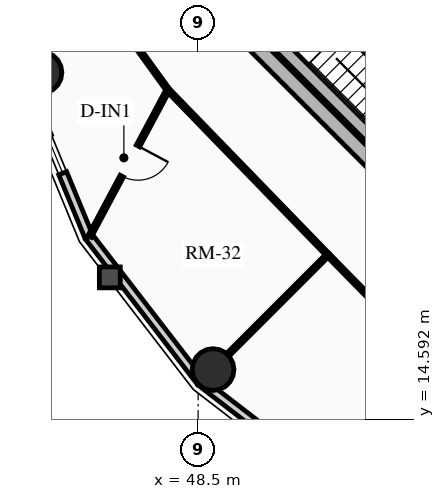
"""IFC4 building model, lengths in metres.
Left out: names, types, materials, properties, quantities, classifications, styles, units other than length and angle.
Written with IfcOpenShell. Run it as: python <this file> out.ifc"""

import sys

from ifc_helpers import new_model, si_unit, direction, frame, frame_2d, origin, origin_2d, place, context, subcontext, project, spatial, rectangle, circle, extrude, source, transform, mapped, element, fill, save


model = new_model("IFC4")
c1 = context("Model", 3, precision=1e-05, world=origin(), true_north=direction((0.0, 1.0)))
c2 = subcontext(c1, "Body", "Model", "MODEL_VIEW")
j1 = project(units=[si_unit("LENGTHUNIT", "METRE"), si_unit("PLANEANGLEUNIT", "RADIAN")], contexts=[c1])
p1 = place(None, origin())
s1 = spatial("IfcSite", under=j1, at=p1, CompositionType="ELEMENT")
p2 = place(p1, origin())
s2 = spatial("IfcBuilding", under=s1, at=p2, CompositionType="ELEMENT")
p3 = place(p2, frame((0.0, 0.0, 229.25)))
s3 = spatial("IfcBuildingStorey", under=s2, at=p3, CompositionType="ELEMENT", Elevation=229.25)
p4 = place(p3, frame((58.702, 15.732, 0.0), z_axis=(0.0, 0.0, 1.0), x_axis=(-0.707106781187, 0.707106781187, 0.0)))
e1 = element("IfcWall", 1, at=p4, inside=s3, PredefinedType="SHEAR", context=c2, shape_type="SweptSolid", body=[
    extrude(rectangle(XDim=14.1, YDim=0.4, at=frame_2d((7.05, 0.0))), origin(), (0.0, 0.0, 1.0), 3.2),
])
p5 = place(p3, frame((61.06, 18.373, 0.0), z_axis=(0.0, 0.0, 1.0), x_axis=(-0.707106781187, 0.707106781187, 0.0)))
e2 = element("IfcWall", 2, at=p5, inside=s3, PredefinedType="SHEAR", context=c2, shape_type="SweptSolid", body=[
    extrude(rectangle(XDim=13.7, YDim=0.35, at=frame_2d((6.85, 0.0))), origin(), (0.0, 0.0, 1.0), 3.2),
])
m1 = source(origin(), c2, "Body", "SweptSolid", [
    extrude(rectangle(XDim=1.1, YDim=2.015, at=frame_2d((0.55, 1.007))), frame((0.0, 0.185, 0.0), z_axis=(0.0, -1.0, 0.0), x_axis=(1.0, 0.0, 0.0)), (0.0, 0.0, 1.0), 0.37),
])
p6 = place(p5, frame((4.85, 0.0, 0.0)))
e3 = element("IfcOpeningElement", 3, at=p6, cuts=e2, PredefinedType="OPENING", context=c2, shape_type="MappedRepresentation", body=[
    mapped(m1, transform((0.0, 0.0, 0.0), x_axis=(1.0, 0.0, 0.0), y_axis=(0.0, 1.0, 0.0), z_axis=(0.0, 0.0, 1.0), scale=1.0)),
])
p7 = place(p5, frame((0.625, 0.0, 0.0)))
e4 = element("IfcOpeningElement", 4, at=p7, cuts=e2, PredefinedType="OPENING", context=c2, shape_type="MappedRepresentation", body=[
    mapped(m1, transform((0.0, 0.0, 0.0), x_axis=(1.0, 0.0, 0.0), y_axis=(0.0, 1.0, 0.0), z_axis=(0.0, 0.0, 1.0), scale=1.0)),
])
p8 = place(p5, frame((2.625, 0.0, 0.0)))
e5 = element("IfcOpeningElement", 5, at=p8, cuts=e2, PredefinedType="OPENING", context=c2, shape_type="MappedRepresentation", body=[
    mapped(m1, transform((0.0, 0.0, 0.0), x_axis=(1.0, 0.0, 0.0), y_axis=(0.0, 1.0, 0.0), z_axis=(0.0, 0.0, 1.0), scale=1.0)),
])
m2 = source(origin(), c2, "Body", "SweptSolid", [
    extrude(rectangle(XDim=1.15, YDim=2.02, at=frame_2d((0.575, 1.01))), frame((0.0, 0.185, 0.0), z_axis=(0.0, -1.0, 0.0), x_axis=(1.0, 0.0, 0.0)), (0.0, 0.0, 1.0), 0.37),
])
p9 = place(p5, frame((7.27, 0.0, 0.0)))
e6 = element("IfcOpeningElement", 6, at=p9, cuts=e2, PredefinedType="OPENING", context=c2, shape_type="MappedRepresentation", body=[
    mapped(m2, transform((0.0, 0.0, 0.0), x_axis=(1.0, 0.0, 0.0), y_axis=(0.0, 1.0, 0.0), z_axis=(0.0, 0.0, 1.0), scale=1.0)),
])
p10 = place(p3, frame((53.922, 21.141, 0.0), z_axis=(0.0, 0.0, 1.0), x_axis=(-0.707106781187, 0.707106781187, 0.0)))
e7 = element("IfcWall", 7, at=p10, inside=s3, PredefinedType="SHEAR", context=c2, shape_type="SweptSolid", body=[
    extrude(rectangle(XDim=6.695, YDim=0.35, at=frame_2d((3.348, 0.0))), origin(), (0.0, 0.0, 1.0), 3.2),
])
for number, where, z_axis, x_axis in (
    (8, (44.365, 23.709, 0.0), (0.0, 0.0, 1.0), (1.0, 0.0, 0.0)),
    (9, (48.893, 15.893, 0.0), (0.0, 0.0, 1.0), (1.0, 0.0, 0.0)),
):
    element("IfcColumn", number, at=place(p3, frame(where, z_axis=z_axis, x_axis=x_axis)), inside=s3, PredefinedType="USERDEFINED", context=c2, shape_type="SweptSolid", body=[
        extrude(circle(Radius=0.55, at=origin_2d()), origin(), (0.0, 0.0, 1.0), 3.2),
    ])
p11 = place(p3, frame((45.626, 19.387, 0.0), z_axis=(0.0, 0.0, 1.0), x_axis=(-0.381309704956, 0.924447353237, 0.0)))
e10 = element("IfcWall", 10, at=p11, inside=s3, PredefinedType="SOLIDWALL", context=c2, shape_type="SweptSolid", body=[
    extrude(rectangle(XDim=4.671, YDim=0.22, at=frame_2d((2.335, 0.0))), origin(), (0.0, 0.0, 1.0), 2.612),
])
m3 = source(origin(), c2, "Body", "SweptSolid", [
    extrude(rectangle(XDim=1.05, YDim=1.3, at=frame_2d((0.525, 0.65))), frame((0.0, 0.12, 0.0), z_axis=(0.0, -1.0, 0.0), x_axis=(1.0, 0.0, 0.0)), (0.0, 0.0, 1.0), 0.24),
])
p12 = place(p11, frame((1.81, 0.0, 0.65)))
e11 = element("IfcOpeningElement", 11, at=p12, cuts=e10, PredefinedType="OPENING", context=c2, shape_type="MappedRepresentation", body=[
    mapped(m3, transform((0.0, 0.0, 0.0), x_axis=(1.0, 0.0, 0.0), y_axis=(0.0, 1.0, 0.0), z_axis=(0.0, 0.0, 1.0), scale=1.0)),
])
p13 = place(p3, frame((48.569, 15.569, 0.0), z_axis=(0.0, 0.0, 1.0), x_axis=(-0.610523083886, 0.791998462147, 0.0)))
e12 = element("IfcWall", 12, at=p13, inside=s3, PredefinedType="SOLIDWALL", context=c2, shape_type="SweptSolid", body=[
    extrude(rectangle(XDim=4.82, YDim=0.22, at=frame_2d((2.41, 0.0))), origin(), (0.0, 0.0, 1.0), 2.612),
])
p14 = place(p3, frame((52.387, 12.626, 0.0), z_axis=(0.0, 0.0, 1.0), x_axis=(-0.791998462147, 0.610523083886, 0.0)))
e13 = element("IfcWall", 13, at=p14, inside=s3, PredefinedType="SOLIDWALL", context=c2, shape_type="SweptSolid", body=[
    extrude(rectangle(XDim=4.82, YDim=0.22, at=frame_2d((2.41, 0.0))), origin(), (0.0, 0.0, 1.0), 2.612),
])
p15 = place(p14, frame((1.885, 0.0, 0.65)))
e14 = element("IfcOpeningElement", 14, at=p15, cuts=e13, PredefinedType="OPENING", context=c2, shape_type="MappedRepresentation", body=[
    mapped(m3, transform((0.0, 0.0, 0.0), x_axis=(1.0, 0.0, 0.0), y_axis=(0.0, 1.0, 0.0), z_axis=(0.0, 0.0, 1.0), scale=1.0)),
])
p16 = place(p3, frame((46.795, 24.513, 0.0), z_axis=(0.0, 0.0, 1.0), x_axis=(0.585628197524, -0.810579801294, 0.0)))
e15 = element("IfcWall", 15, at=p16, inside=s3, PredefinedType="MOVABLE", context=c2, shape_type="SweptSolid", body=[
    extrude(rectangle(XDim=1.554, YDim=0.1, at=frame_2d((0.777, 0.0))), origin(), (0.0, 0.0, 1.0), 2.545),
])
p17 = place(p3, frame((47.706, 23.253, 0.0), z_axis=(0.0, 0.0, 1.0), x_axis=(0.696179266346, -0.717867974707, 0.0)))
e16 = element("IfcWall", 16, at=p17, inside=s3, PredefinedType="MOVABLE", context=c2, shape_type="SweptSolid", body=[
    extrude(rectangle(XDim=6.045, YDim=0.1, at=frame_2d((3.022, 0.0))), origin(), (0.0, 0.0, 1.0), 2.545),
])
p18 = place(p3, frame((51.914, 18.914, 0.0), z_axis=(0.0, 0.0, 1.0), x_axis=(0.699999313799, -0.714143515465, 0.0)))
e17 = element("IfcWall", 17, at=p18, inside=s3, PredefinedType="MOVABLE", context=c2, shape_type="SweptSolid", body=[
    extrude(rectangle(XDim=6.162, YDim=0.1, at=frame_2d((3.081, 0.0))), origin(), (0.0, 0.0, 1.0), 2.545),
])
m4 = source(origin(), c2, "Body", "SweptSolid", [
    extrude(rectangle(XDim=1.05, YDim=2.015, at=frame_2d((0.525, 1.007))), frame((0.0, 0.06, 0.0), z_axis=(0.0, -1.0, 0.0), x_axis=(1.0, 0.0, 0.0)), (0.0, 0.0, 1.0), 0.12),
])
p19 = place(p18, frame((2.556, 0.0, 0.0)))
e18 = element("IfcOpeningElement", 18, at=p19, cuts=e17, PredefinedType="OPENING", context=c2, shape_type="MappedRepresentation", body=[
    mapped(m4, transform((0.0, 0.0, 0.0), x_axis=(1.0, 0.0, 0.0), y_axis=(0.0, 1.0, 0.0), z_axis=(0.0, 0.0, 1.0), scale=1.0)),
])
p20 = place(p3, frame((51.914, 18.914, 0.0), z_axis=(0.0, 0.0, 1.0), x_axis=(-0.707106781187, -0.707106781187, 0.0)))
e19 = element("IfcWall", 19, at=p20, inside=s3, PredefinedType="MOVABLE", context=c2, shape_type="SweptSolid", body=[
    extrude(rectangle(XDim=4.71, YDim=0.1, at=frame_2d((2.355, 0.0))), origin(), (0.0, 0.0, 1.0), 2.612),
])
p21 = place(p3, frame((47.706, 23.253, 0.0), z_axis=(0.0, 0.0, 1.0), x_axis=(-0.471384756618, -0.881927667799, 0.0)))
e20 = element("IfcWall", 20, at=p21, inside=s3, PredefinedType="MOVABLE", context=c2, shape_type="SweptSolid", body=[
    extrude(rectangle(XDim=4.374, YDim=0.1, at=frame_2d((2.187, 0.0))), origin(), (0.0, 0.0, 1.0), 2.545),
])
m5 = source(origin(), c2, "Body", "SweptSolid", [
    extrude(rectangle(XDim=0.9, YDim=2.005, at=frame_2d((0.45, 1.002))), frame((0.0, 0.06, 0.0), z_axis=(0.0, -1.0, 0.0), x_axis=(1.0, 0.0, 0.0)), (0.0, 0.0, 1.0), 0.12),
])
p22 = place(p21, frame((1.674, 0.0, 0.0)))
e21 = element("IfcOpeningElement", 21, at=p22, cuts=e20, PredefinedType="OPENING", context=c2, shape_type="MappedRepresentation", body=[
    mapped(m5, transform((0.0, 0.0, 0.0), x_axis=(1.0, 0.0, 0.0), y_axis=(0.0, 1.0, 0.0), z_axis=(0.0, 0.0, 1.0), scale=1.0)),
])
m6 = source(origin(), c2, "Body", "SweptSolid", [
    extrude(rectangle(XDim=1.05, YDim=1.3, at=frame_2d((0.525, 0.65))), frame((0.0, 0.03, 0.0), z_axis=(0.0, -1.0, 0.0), x_axis=(1.0, 0.0, 0.0)), (0.0, 0.0, 1.0), 0.06),
])
p23 = place(p12, origin())
e22 = element("IfcWindow", 22, at=p23, inside=s3, PartitioningType="SINGLE_PANEL", PredefinedType="WINDOW", context=c2, shape_type="MappedRepresentation", body=[
    mapped(m6, transform((0.0, 0.0, 0.0), x_axis=(1.0, 0.0, 0.0), y_axis=(0.0, 1.0, 0.0), z_axis=(0.0, 0.0, 1.0), scale=1.0)),
])
fill(e11, e22)
m7 = source(origin(), c2, "Body", "SweptSolid", [
    extrude(rectangle(XDim=0.9, YDim=2.005, at=frame_2d((0.45, 1.002))), frame((0.0, 0.025, 0.0), z_axis=(0.0, -1.0, 0.0), x_axis=(1.0, 0.0, 0.0)), (0.0, 0.0, 1.0), 0.05),
])
p24 = place(p22, origin())
e23 = element("IfcDoor", 23, at=p24, inside=s3, OperationType="SINGLE_SWING_LEFT", PredefinedType="DOOR", context=c2, shape_type="MappedRepresentation", body=[
    mapped(m7, transform((0.0, 0.0, 0.0), x_axis=(1.0, 0.0, 0.0), y_axis=(0.0, 1.0, 0.0), z_axis=(0.0, 0.0, 1.0), scale=1.0)),
])
fill(e21, e23)
save(model, sys.argv[1])
